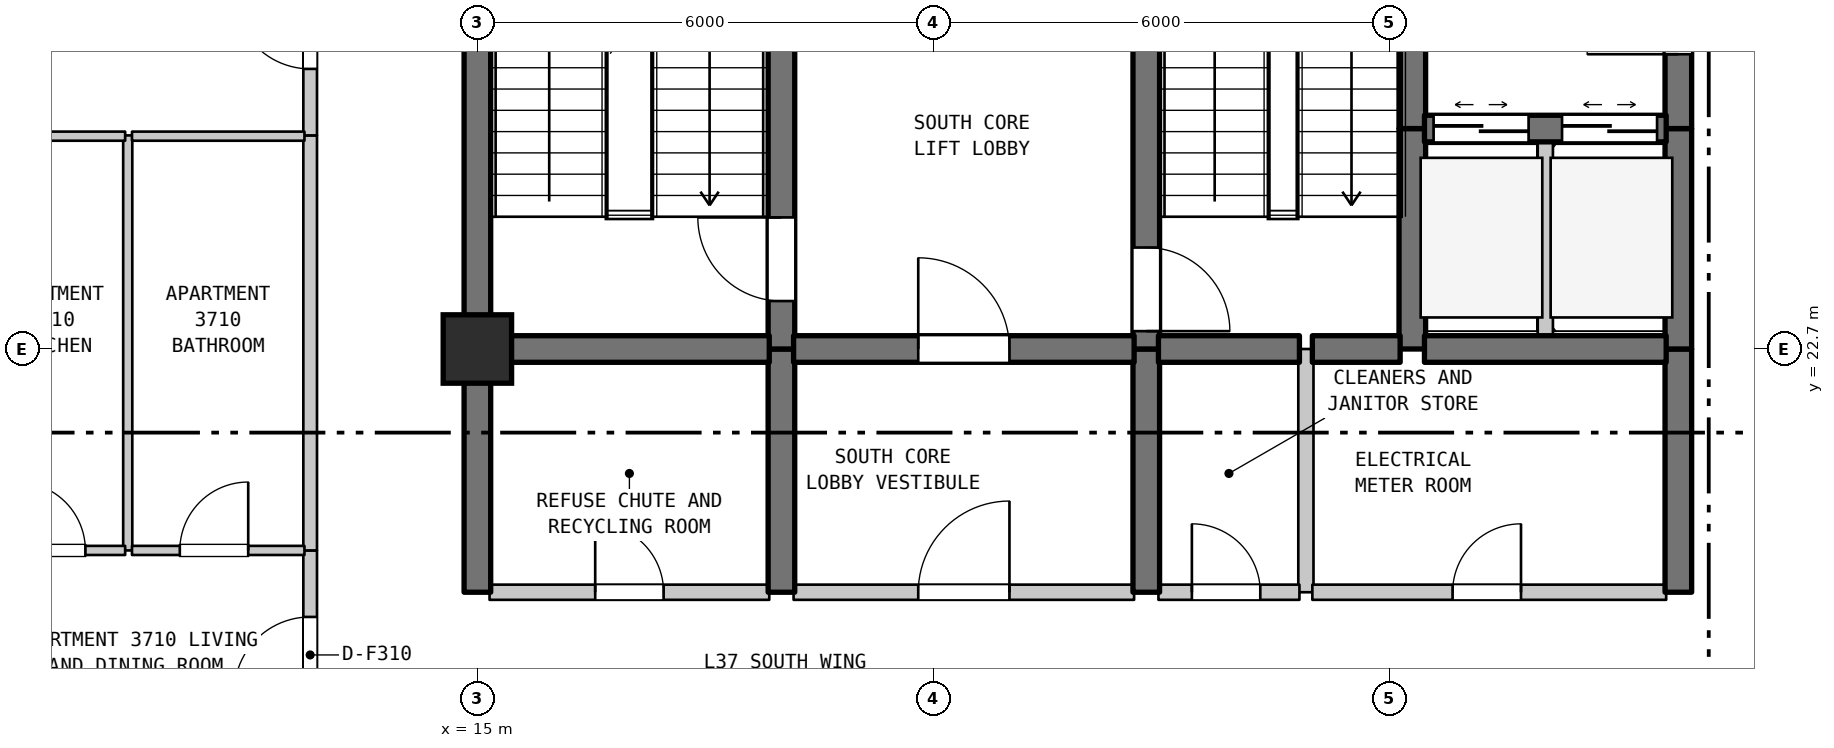
"""IFC4 building model, lengths in metres.
Left out: names, types, materials, properties, quantities, classifications, styles, units other than length and angle.
Written with IfcOpenShell. Run it as: python <this file> out.ifc"""

import sys

from ifc_helpers import new_model, si_unit, direction, frame, frame_2d, origin, origin_2d, place, context, subcontext, project, spatial, rectangle, extrude, element, fill, save


model = new_model("IFC4")
c1 = context("Model", 3, precision=1e-05, world=origin(), true_north=direction((0.0, 1.0)))
c2 = subcontext(c1, "Body", "Model", "MODEL_VIEW")
j1 = project(units=[si_unit("LENGTHUNIT", "METRE"), si_unit("PLANEANGLEUNIT", "RADIAN")], contexts=[c1])
p1 = place(None, origin())
s1 = spatial("IfcSite", under=j1, at=p1, CompositionType="ELEMENT")
p2 = place(p1, origin())
s2 = spatial("IfcBuilding", under=s1, at=p2, CompositionType="ELEMENT")
p3 = place(p2, frame((0.0, 0.0, 152.0)))
s3 = spatial("IfcBuildingStorey", under=s2, at=p3, CompositionType="ELEMENT", Elevation=152.0)
p4 = place(p3, frame((15.0, 22.7, 0.0), z_axis=(0.0, 0.0, 1.0), x_axis=(1.0, 0.0, 0.0)))
e1 = element("IfcColumn", 1, at=p4, inside=s3, PredefinedType="COLUMN", context=c2, shape_type="SweptSolid", body=[
    extrude(rectangle(XDim=0.9, YDim=0.9, at=origin_2d()), origin(), (0.0, 0.0, 1.0), 3.7),
])
p5 = place(p3, frame((10.4, 20.05, 0.0), z_axis=(0.0, 0.0, 1.0), x_axis=(0.0, 1.0, 0.0)))
e2 = element("IfcWall", 2, at=p5, inside=s3, PredefinedType="PARTITIONING", context=c2, shape_type="SweptSolid", body=[
    extrude(rectangle(XDim=5.46, YDim=0.12, at=frame_2d((2.73, 0.0))), origin(), (0.0, 0.0, 1.0), 3.385),
])
p6 = place(p3, frame((12.8, 17.3, 0.0), z_axis=(0.0, 0.0, 1.0), x_axis=(0.0, 1.0, 0.0)))
e3 = element("IfcWall", 3, at=p6, inside=s3, PredefinedType="STANDARD", context=c2, shape_type="SweptSolid", body=[
    extrude(rectangle(XDim=2.75, YDim=0.18, at=frame_2d((1.375, 0.0))), origin(), (0.0, 0.0, 1.0), 3.385),
])
p7 = place(p6, frame((0.875, 0.0, 0.0)))
e4 = element("IfcOpeningElement", 4, at=p7, cuts=e3, PredefinedType="OPENING", context=c2, shape_type="SweptSolid", body=[
    extrude(rectangle(XDim=1.0, YDim=2.15, at=frame_2d((0.5, 1.075))), frame((0.0, 0.1, 0.0), z_axis=(0.0, -1.0, 0.0), x_axis=(1.0, 0.0, 0.0)), (0.0, 0.0, 1.0), 0.2),
])
p8 = place(p3, frame((12.8, 20.05, 0.0), z_axis=(0.0, 0.0, 1.0), x_axis=(0.0, 1.0, 0.0)))
e5 = element("IfcWall", 5, at=p8, inside=s3, PredefinedType="STANDARD", context=c2, shape_type="SweptSolid", body=[
    extrude(rectangle(XDim=5.46, YDim=0.18, at=frame_2d((2.73, 0.0))), origin(), (0.0, 0.0, 1.0), 3.385),
])
p9 = place(p3, frame((12.8, 25.51, 0.0), z_axis=(0.0, 0.0, 1.0), x_axis=(0.0, 1.0, 0.0)))
e6 = element("IfcWall", 6, at=p9, inside=s3, PredefinedType="STANDARD", context=c2, shape_type="SweptSolid", body=[
    extrude(rectangle(XDim=2.75, YDim=0.18, at=frame_2d((1.375, 0.0))), origin(), (0.0, 0.0, 1.0), 3.385),
])
p10 = place(p9, frame((0.875, 0.0, 0.0)))
e7 = element("IfcOpeningElement", 7, at=p10, cuts=e6, PredefinedType="OPENING", context=c2, shape_type="SweptSolid", body=[
    extrude(rectangle(XDim=1.0, YDim=2.15, at=frame_2d((0.5, 1.075))), frame((0.0, 0.1, 0.0), z_axis=(0.0, -1.0, 0.0), x_axis=(1.0, 0.0, 0.0)), (0.0, 0.0, 1.0), 0.2),
])
p11 = place(p3, frame((15.0, 19.5, 0.0), z_axis=(0.0, 0.0, 1.0), x_axis=(0.0, 1.0, 0.0)))
e8 = element("IfcWall", 8, at=p11, inside=s3, PredefinedType="SHEAR", context=c2, shape_type="SweptSolid", body=[
    extrude(rectangle(XDim=3.2, YDim=0.35, at=frame_2d((1.6, 0.0))), origin(), (0.0, 0.0, 1.0), 3.385),
])
p12 = place(p3, frame((15.0, 22.7, 0.0), z_axis=(0.0, 0.0, 1.0), x_axis=(0.0, 1.0, 0.0)))
e9 = element("IfcWall", 9, at=p12, inside=s3, PredefinedType="SHEAR", context=c2, shape_type="SweptSolid", body=[
    extrude(rectangle(XDim=6.8, YDim=0.35, at=frame_2d((3.4, 0.0))), origin(), (0.0, 0.0, 1.0), 3.385),
])
p13 = place(p3, frame((19.0, 19.5, 0.0), z_axis=(0.0, 0.0, 1.0), x_axis=(0.0, 1.0, 0.0)))
e10 = element("IfcWall", 10, at=p13, inside=s3, PredefinedType="SHEAR", context=c2, shape_type="SweptSolid", body=[
    extrude(rectangle(XDim=3.2, YDim=0.35, at=frame_2d((1.6, 0.0))), origin(), (0.0, 0.0, 1.0), 3.385),
])
p14 = place(p3, frame((19.0, 22.7, 0.0), z_axis=(0.0, 0.0, 1.0), x_axis=(0.0, 1.0, 0.0)))
e11 = element("IfcWall", 11, at=p14, inside=s3, PredefinedType="SHEAR", context=c2, shape_type="SweptSolid", body=[
    extrude(rectangle(XDim=5.5, YDim=0.35, at=frame_2d((2.75, 0.0))), origin(), (0.0, 0.0, 1.0), 3.385),
])
p15 = place(p14, frame((0.631, 0.0, 0.0)))
e12 = element("IfcOpeningElement", 12, at=p15, cuts=e11, PredefinedType="OPENING", context=c2, shape_type="SweptSolid", body=[
    extrude(rectangle(XDim=1.1, YDim=2.15, at=frame_2d((0.55, 1.075))), frame((0.0, 0.185, 0.0), z_axis=(0.0, -1.0, 0.0), x_axis=(1.0, 0.0, 0.0)), (0.0, 0.0, 1.0), 0.37),
])
p16 = place(p3, frame((23.8, 19.5, 0.0), z_axis=(0.0, 0.0, 1.0), x_axis=(0.0, 1.0, 0.0)))
e13 = element("IfcWall", 13, at=p16, inside=s3, PredefinedType="SHEAR", context=c2, shape_type="SweptSolid", body=[
    extrude(rectangle(XDim=3.2, YDim=0.35, at=frame_2d((1.6, 0.0))), origin(), (0.0, 0.0, 1.0), 3.385),
])
p17 = place(p3, frame((23.8, 22.7, 0.0), z_axis=(0.0, 0.0, 1.0), x_axis=(0.0, 1.0, 0.0)))
e14 = element("IfcWall", 14, at=p17, inside=s3, PredefinedType="SHEAR", context=c2, shape_type="SweptSolid", body=[
    extrude(rectangle(XDim=5.5, YDim=0.35, at=frame_2d((2.75, 0.0))), origin(), (0.0, 0.0, 1.0), 3.385),
])
p18 = place(p17, frame((0.235, 0.0, 0.0)))
e15 = element("IfcOpeningElement", 15, at=p18, cuts=e14, PredefinedType="OPENING", context=c2, shape_type="SweptSolid", body=[
    extrude(rectangle(XDim=1.1, YDim=2.15, at=frame_2d((0.55, 1.075))), frame((0.0, 0.185, 0.0), z_axis=(0.0, -1.0, 0.0), x_axis=(1.0, 0.0, 0.0)), (0.0, 0.0, 1.0), 0.37),
])
p19 = place(p3, frame((25.9, 19.5, 0.0), z_axis=(0.0, 0.0, 1.0), x_axis=(0.0, 1.0, 0.0)))
e16 = element("IfcWall", 16, at=p19, inside=s3, PredefinedType="STANDARD", context=c2, shape_type="SweptSolid", body=[
    extrude(rectangle(XDim=3.2, YDim=0.2, at=frame_2d((1.6, 0.0))), origin(), (0.0, 0.0, 1.0), 3.385),
])
p20 = place(p3, frame((27.3, 22.7, 0.0), z_axis=(0.0, 0.0, 1.0), x_axis=(0.0, 1.0, 0.0)))
e17 = element("IfcWall", 17, at=p20, inside=s3, PredefinedType="SHEAR", context=c2, shape_type="SweptSolid", body=[
    extrude(rectangle(XDim=2.9, YDim=0.35, at=frame_2d((1.45, 0.0))), origin(), (0.0, 0.0, 1.0), 3.385),
])
p21 = place(p3, frame((27.3, 25.6, 0.0), z_axis=(0.0, 0.0, 1.0), x_axis=(0.0, 1.0, 0.0)))
e18 = element("IfcWall", 18, at=p21, inside=s3, PredefinedType="SHEAR", context=c2, shape_type="SweptSolid", body=[
    extrude(rectangle(XDim=3.3, YDim=0.35, at=frame_2d((1.65, 0.0))), origin(), (0.0, 0.0, 1.0), 3.385),
])
p22 = place(p3, frame((29.05, 22.7, 0.0), z_axis=(0.0, 0.0, 1.0), x_axis=(0.0, 1.0, 0.0)))
e19 = element("IfcWall", 19, at=p22, inside=s3, PredefinedType="STANDARD", context=c2, shape_type="SweptSolid", body=[
    extrude(rectangle(XDim=2.9, YDim=0.2, at=frame_2d((1.45, 0.0))), origin(), (0.0, 0.0, 1.0), 3.385),
])
p23 = place(p3, frame((30.8, 19.5, 0.0), z_axis=(0.0, 0.0, 1.0), x_axis=(0.0, 1.0, 0.0)))
e20 = element("IfcWall", 20, at=p23, inside=s3, PredefinedType="SHEAR", context=c2, shape_type="SweptSolid", body=[
    extrude(rectangle(XDim=3.2, YDim=0.35, at=frame_2d((1.6, 0.0))), origin(), (0.0, 0.0, 1.0), 3.385),
])
p24 = place(p3, frame((30.8, 22.7, 0.0), z_axis=(0.0, 0.0, 1.0), x_axis=(0.0, 1.0, 0.0)))
e21 = element("IfcWall", 21, at=p24, inside=s3, PredefinedType="SHEAR", context=c2, shape_type="SweptSolid", body=[
    extrude(rectangle(XDim=2.9, YDim=0.35, at=frame_2d((1.45, 0.0))), origin(), (0.0, 0.0, 1.0), 3.385),
])
p25 = place(p3, frame((30.8, 25.6, 0.0), z_axis=(0.0, 0.0, 1.0), x_axis=(0.0, 1.0, 0.0)))
e22 = element("IfcWall", 22, at=p25, inside=s3, PredefinedType="SHEAR", context=c2, shape_type="SweptSolid", body=[
    extrude(rectangle(XDim=3.3, YDim=0.35, at=frame_2d((1.65, 0.0))), origin(), (0.0, 0.0, 1.0), 3.385),
])
p26 = place(p25, frame((0.978, 0.0, 0.0)))
e23 = element("IfcOpeningElement", 23, at=p26, cuts=e22, PredefinedType="OPENING", context=c2, shape_type="SweptSolid", body=[
    extrude(rectangle(XDim=1.2, YDim=2.2, at=frame_2d((0.6, 1.1))), frame((0.0, 0.185, 0.0), z_axis=(0.0, -1.0, 0.0), x_axis=(1.0, 0.0, 0.0)), (0.0, 0.0, 1.0), 0.37),
])
p27 = place(p3, frame((15.16, 19.5, 0.0), z_axis=(0.0, 0.0, 1.0), x_axis=(1.0, 0.0, 0.0)))
e24 = element("IfcWall", 24, at=p27, inside=s3, PredefinedType="STANDARD", context=c2, shape_type="SweptSolid", body=[
    extrude(rectangle(XDim=3.68, YDim=0.2, at=frame_2d((1.84, 0.0))), origin(), (0.0, 0.0, 1.0), 3.385),
])
p28 = place(p27, frame((1.39, 0.0, 0.0)))
e25 = element("IfcOpeningElement", 25, at=p28, cuts=e24, PredefinedType="OPENING", context=c2, shape_type="SweptSolid", body=[
    extrude(rectangle(XDim=0.9, YDim=2.15, at=frame_2d((0.45, 1.075))), frame((0.0, 0.11, 0.0), z_axis=(0.0, -1.0, 0.0), x_axis=(1.0, 0.0, 0.0)), (0.0, 0.0, 1.0), 0.22),
])
p29 = place(p3, frame((19.16, 19.5, 0.0), z_axis=(0.0, 0.0, 1.0), x_axis=(1.0, 0.0, 0.0)))
e26 = element("IfcWall", 26, at=p29, inside=s3, PredefinedType="STANDARD", context=c2, shape_type="SweptSolid", body=[
    extrude(rectangle(XDim=4.48, YDim=0.2, at=frame_2d((2.24, 0.0))), origin(), (0.0, 0.0, 1.0), 3.385),
])
p30 = place(p29, frame((1.64, 0.0, 0.0)))
e27 = element("IfcOpeningElement", 27, at=p30, cuts=e26, PredefinedType="OPENING", context=c2, shape_type="SweptSolid", body=[
    extrude(rectangle(XDim=1.2, YDim=2.2, at=frame_2d((0.6, 1.1))), frame((0.0, 0.11, 0.0), z_axis=(0.0, -1.0, 0.0), x_axis=(1.0, 0.0, 0.0)), (0.0, 0.0, 1.0), 0.22),
])
p31 = place(p3, frame((23.96, 19.5, 0.0), z_axis=(0.0, 0.0, 1.0), x_axis=(1.0, 0.0, 0.0)))
e28 = element("IfcWall", 28, at=p31, inside=s3, PredefinedType="STANDARD", context=c2, shape_type="SweptSolid", body=[
    extrude(rectangle(XDim=1.855, YDim=0.2, at=frame_2d((0.927, 0.0))), origin(), (0.0, 0.0, 1.0), 3.385),
])
p32 = place(p31, frame((0.44, 0.0, 0.0)))
e29 = element("IfcOpeningElement", 29, at=p32, cuts=e28, PredefinedType="OPENING", context=c2, shape_type="SweptSolid", body=[
    extrude(rectangle(XDim=0.9, YDim=2.15, at=frame_2d((0.45, 1.075))), frame((0.0, 0.11, 0.0), z_axis=(0.0, -1.0, 0.0), x_axis=(1.0, 0.0, 0.0)), (0.0, 0.0, 1.0), 0.22),
])
p33 = place(p3, frame((25.985, 19.5, 0.0), z_axis=(0.0, 0.0, 1.0), x_axis=(1.0, 0.0, 0.0)))
e30 = element("IfcWall", 30, at=p33, inside=s3, PredefinedType="STANDARD", context=c2, shape_type="SweptSolid", body=[
    extrude(rectangle(XDim=4.655, YDim=0.2, at=frame_2d((2.327, 0.0))), origin(), (0.0, 0.0, 1.0), 3.385),
])
p34 = place(p33, frame((1.845, 0.0, 0.0)))
e31 = element("IfcOpeningElement", 31, at=p34, cuts=e30, PredefinedType="OPENING", context=c2, shape_type="SweptSolid", body=[
    extrude(rectangle(XDim=0.9, YDim=2.15, at=frame_2d((0.45, 1.075))), frame((0.0, 0.11, 0.0), z_axis=(0.0, -1.0, 0.0), x_axis=(1.0, 0.0, 0.0)), (0.0, 0.0, 1.0), 0.22),
])
p35 = place(p3, frame((8.421, 20.05, 0.0), z_axis=(0.0, 0.0, 1.0), x_axis=(1.0, 0.0, 0.0)))
e32 = element("IfcWall", 32, at=p35, inside=s3, PredefinedType="PARTITIONING", context=c2, shape_type="SweptSolid", body=[
    extrude(rectangle(XDim=1.945, YDim=0.12, at=frame_2d((0.973, 0.0))), origin(), (0.0, 0.0, 1.0), 3.385),
])
p36 = place(p35, frame((0.522, 0.0, 0.0)))
e33 = element("IfcOpeningElement", 33, at=p36, cuts=e32, PredefinedType="OPENING", context=c2, shape_type="SweptSolid", body=[
    extrude(rectangle(XDim=0.9, YDim=2.15, at=frame_2d((0.45, 1.075))), frame((0.0, 0.07, 0.0), z_axis=(0.0, -1.0, 0.0), x_axis=(1.0, 0.0, 0.0)), (0.0, 0.0, 1.0), 0.14),
])
p37 = place(p3, frame((10.456, 20.05, 0.0), z_axis=(0.0, 0.0, 1.0), x_axis=(1.0, 0.0, 0.0)))
e34 = element("IfcWall", 34, at=p37, inside=s3, PredefinedType="PARTITIONING", context=c2, shape_type="SweptSolid", body=[
    extrude(rectangle(XDim=2.269, YDim=0.12, at=frame_2d((1.135, 0.0))), origin(), (0.0, 0.0, 1.0), 3.385),
])
p38 = place(p37, frame((0.629, 0.0, 0.0)))
e35 = element("IfcOpeningElement", 35, at=p38, cuts=e34, PredefinedType="OPENING", context=c2, shape_type="SweptSolid", body=[
    extrude(rectangle(XDim=0.9, YDim=2.1, at=frame_2d((0.45, 1.05))), frame((0.0, 0.07, 0.0), z_axis=(0.0, -1.0, 0.0), x_axis=(1.0, 0.0, 0.0)), (0.0, 0.0, 1.0), 0.14),
])
p39 = place(p3, frame((15.16, 22.7, 0.0), z_axis=(0.0, 0.0, 1.0), x_axis=(1.0, 0.0, 0.0)))
e36 = element("IfcWall", 36, at=p39, inside=s3, PredefinedType="SHEAR", context=c2, shape_type="SweptSolid", body=[
    extrude(rectangle(XDim=3.68, YDim=0.35, at=frame_2d((1.84, 0.0))), origin(), (0.0, 0.0, 1.0), 3.385),
])
p40 = place(p3, frame((19.16, 22.7, 0.0), z_axis=(0.0, 0.0, 1.0), x_axis=(1.0, 0.0, 0.0)))
e37 = element("IfcWall", 37, at=p40, inside=s3, PredefinedType="SHEAR", context=c2, shape_type="SweptSolid", body=[
    extrude(rectangle(XDim=4.48, YDim=0.35, at=frame_2d((2.24, 0.0))), origin(), (0.0, 0.0, 1.0), 3.385),
])
p41 = place(p40, frame((1.64, 0.0, 0.0)))
e38 = element("IfcOpeningElement", 38, at=p41, cuts=e37, PredefinedType="OPENING", context=c2, shape_type="SweptSolid", body=[
    extrude(rectangle(XDim=1.2, YDim=2.2, at=frame_2d((0.6, 1.1))), frame((0.0, 0.185, 0.0), z_axis=(0.0, -1.0, 0.0), x_axis=(1.0, 0.0, 0.0)), (0.0, 0.0, 1.0), 0.37),
])
p42 = place(p3, frame((23.96, 22.7, 0.0), z_axis=(0.0, 0.0, 1.0), x_axis=(1.0, 0.0, 0.0)))
e39 = element("IfcWall", 39, at=p42, inside=s3, PredefinedType="SHEAR", context=c2, shape_type="SweptSolid", body=[
    extrude(rectangle(XDim=1.855, YDim=0.35, at=frame_2d((0.927, 0.0))), origin(), (0.0, 0.0, 1.0), 3.385),
])
p43 = place(p3, frame((25.985, 22.7, 0.0), z_axis=(0.0, 0.0, 1.0), x_axis=(1.0, 0.0, 0.0)))
e40 = element("IfcWall", 40, at=p43, inside=s3, PredefinedType="SHEAR", context=c2, shape_type="SweptSolid", body=[
    extrude(rectangle(XDim=1.155, YDim=0.35, at=frame_2d((0.577, 0.0))), origin(), (0.0, 0.0, 1.0), 3.385),
])
p44 = place(p3, frame((27.46, 22.7, 0.0), z_axis=(0.0, 0.0, 1.0), x_axis=(1.0, 0.0, 0.0)))
e41 = element("IfcWall", 41, at=p44, inside=s3, PredefinedType="SHEAR", context=c2, shape_type="SweptSolid", body=[
    extrude(rectangle(XDim=3.18, YDim=0.35, at=frame_2d((1.59, 0.0))), origin(), (0.0, 0.0, 1.0), 3.385),
])
p45 = place(p3, frame((8.421, 25.5, 0.0), z_axis=(0.0, 0.0, 1.0), x_axis=(1.0, 0.0, 0.0)))
e42 = element("IfcWall", 42, at=p45, inside=s3, PredefinedType="PARTITIONING", context=c2, shape_type="SweptSolid", body=[
    extrude(rectangle(XDim=1.945, YDim=0.12, at=frame_2d((0.973, 0.0))), origin(), (0.0, 0.0, 1.0), 3.385),
])
p46 = place(p3, frame((10.456, 25.5, 0.0), z_axis=(0.0, 0.0, 1.0), x_axis=(1.0, 0.0, 0.0)))
e43 = element("IfcWall", 43, at=p46, inside=s3, PredefinedType="PARTITIONING", context=c2, shape_type="SweptSolid", body=[
    extrude(rectangle(XDim=2.269, YDim=0.12, at=frame_2d((1.135, 0.0))), origin(), (0.0, 0.0, 1.0), 3.385),
])
p47 = place(p3, frame((27.46, 25.6, 0.0), z_axis=(0.0, 0.0, 1.0), x_axis=(1.0, 0.0, 0.0)))
e44 = element("IfcWall", 44, at=p47, inside=s3, PredefinedType="SHEAR", context=c2, shape_type="SweptSolid", body=[
    extrude(rectangle(XDim=3.18, YDim=0.35, at=frame_2d((1.59, 0.0))), origin(), (0.0, 0.0, 1.0), 3.385),
])
p48 = place(p47, frame((0.12, 0.0, 0.0)))
e45 = element("IfcOpeningElement", 45, at=p48, cuts=e44, PredefinedType="OPENING", context=c2, shape_type="SweptSolid", body=[
    extrude(rectangle(XDim=1.25, YDim=2.2, at=frame_2d((0.625, 1.1))), frame((0.0, 0.185, 0.0), z_axis=(0.0, -1.0, 0.0), x_axis=(1.0, 0.0, 0.0)), (0.0, 0.0, 1.0), 0.37),
])
p49 = place(p47, frame((1.81, 0.0, 0.0)))
e46 = element("IfcOpeningElement", 46, at=p49, cuts=e44, PredefinedType="OPENING", context=c2, shape_type="SweptSolid", body=[
    extrude(rectangle(XDim=1.25, YDim=2.2, at=frame_2d((0.625, 1.1))), frame((0.0, 0.185, 0.0), z_axis=(0.0, -1.0, 0.0), x_axis=(1.0, 0.0, 0.0)), (0.0, 0.0, 1.0), 0.37),
])
p50 = place(p7, origin())
e47 = element("IfcDoor", 47, at=p50, inside=s3, OperationType="SINGLE_SWING_LEFT", PredefinedType="DOOR", context=c2, shape_type="SweptSolid", body=[
    extrude(rectangle(XDim=1.0, YDim=2.15, at=frame_2d((0.5, 1.075))), frame((0.0, 0.025, 0.0), z_axis=(0.0, -1.0, 0.0), x_axis=(1.0, 0.0, 0.0)), (0.0, 0.0, 1.0), 0.05),
])
fill(e4, e47)
p51 = place(p10, origin())
e48 = element("IfcDoor", 48, at=p51, inside=s3, OperationType="SINGLE_SWING_RIGHT", PredefinedType="DOOR", context=c2, shape_type="SweptSolid", body=[
    extrude(rectangle(XDim=1.0, YDim=2.15, at=frame_2d((0.5, 1.075))), frame((0.0, 0.025, 0.0), z_axis=(0.0, -1.0, 0.0), x_axis=(1.0, 0.0, 0.0)), (0.0, 0.0, 1.0), 0.05),
])
fill(e7, e48)
p52 = place(p15, origin())
e49 = element("IfcDoor", 49, at=p52, inside=s3, OperationType="SINGLE_SWING_RIGHT", PredefinedType="DOOR", context=c2, shape_type="SweptSolid", body=[
    extrude(rectangle(XDim=1.1, YDim=2.15, at=frame_2d((0.55, 1.075))), frame((0.0, 0.025, 0.0), z_axis=(0.0, -1.0, 0.0), x_axis=(1.0, 0.0, 0.0)), (0.0, 0.0, 1.0), 0.05),
])
fill(e12, e49)
p53 = place(p18, frame((1.1, 0.0, 0.0), z_axis=(0.0, 0.0, 1.0), x_axis=(-1.0, 0.0, 0.0)))
e50 = element("IfcDoor", 50, at=p53, inside=s3, OperationType="SINGLE_SWING_LEFT", PredefinedType="DOOR", context=c2, shape_type="SweptSolid", body=[
    extrude(rectangle(XDim=1.1, YDim=2.15, at=frame_2d((0.55, 1.075))), frame((0.0, 0.025, 0.0), z_axis=(0.0, -1.0, 0.0), x_axis=(1.0, 0.0, 0.0)), (0.0, 0.0, 1.0), 0.05),
])
fill(e15, e50)
p54 = place(p26, origin())
e51 = element("IfcDoor", 51, at=p54, inside=s3, OperationType="SINGLE_SWING_LEFT", PredefinedType="DOOR", context=c2, shape_type="SweptSolid", body=[
    extrude(rectangle(XDim=1.2, YDim=2.2, at=frame_2d((0.6, 1.1))), frame((0.0, 0.025, 0.0), z_axis=(0.0, -1.0, 0.0), x_axis=(1.0, 0.0, 0.0)), (0.0, 0.0, 1.0), 0.05),
])
fill(e23, e51)
p55 = place(p28, origin())
e52 = element("IfcDoor", 52, at=p55, inside=s3, OperationType="SINGLE_SWING_LEFT", PredefinedType="DOOR", context=c2, shape_type="SweptSolid", body=[
    extrude(rectangle(XDim=0.9, YDim=2.15, at=frame_2d((0.45, 1.075))), frame((0.0, 0.025, 0.0), z_axis=(0.0, -1.0, 0.0), x_axis=(1.0, 0.0, 0.0)), (0.0, 0.0, 1.0), 0.05),
])
fill(e25, e52)
p56 = place(p30, origin())
e53 = element("IfcDoor", 53, at=p56, inside=s3, OperationType="SINGLE_SWING_RIGHT", PredefinedType="DOOR", context=c2, shape_type="SweptSolid", body=[
    extrude(rectangle(XDim=1.2, YDim=2.2, at=frame_2d((0.6, 1.1))), frame((0.0, 0.025, 0.0), z_axis=(0.0, -1.0, 0.0), x_axis=(1.0, 0.0, 0.0)), (0.0, 0.0, 1.0), 0.05),
])
fill(e27, e53)
p57 = place(p32, origin())
e54 = element("IfcDoor", 54, at=p57, inside=s3, OperationType="SINGLE_SWING_LEFT", PredefinedType="DOOR", context=c2, shape_type="SweptSolid", body=[
    extrude(rectangle(XDim=0.9, YDim=2.15, at=frame_2d((0.45, 1.075))), frame((0.0, 0.025, 0.0), z_axis=(0.0, -1.0, 0.0), x_axis=(1.0, 0.0, 0.0)), (0.0, 0.0, 1.0), 0.05),
])
fill(e29, e54)
p58 = place(p34, origin())
e55 = element("IfcDoor", 55, at=p58, inside=s3, OperationType="SINGLE_SWING_RIGHT", PredefinedType="DOOR", context=c2, shape_type="SweptSolid", body=[
    extrude(rectangle(XDim=0.9, YDim=2.15, at=frame_2d((0.45, 1.075))), frame((0.0, 0.025, 0.0), z_axis=(0.0, -1.0, 0.0), x_axis=(1.0, 0.0, 0.0)), (0.0, 0.0, 1.0), 0.05),
])
fill(e31, e55)
p59 = place(p36, origin())
e56 = element("IfcDoor", 56, at=p59, inside=s3, OperationType="SINGLE_SWING_LEFT", PredefinedType="DOOR", context=c2, shape_type="SweptSolid", body=[
    extrude(rectangle(XDim=0.9, YDim=2.15, at=frame_2d((0.45, 1.075))), frame((0.0, 0.025, 0.0), z_axis=(0.0, -1.0, 0.0), x_axis=(1.0, 0.0, 0.0)), (0.0, 0.0, 1.0), 0.05),
])
fill(e33, e56)
p60 = place(p38, origin())
e57 = element("IfcDoor", 57, at=p60, inside=s3, OperationType="SINGLE_SWING_RIGHT", PredefinedType="DOOR", context=c2, shape_type="SweptSolid", body=[
    extrude(rectangle(XDim=0.9, YDim=2.1, at=frame_2d((0.45, 1.05))), frame((0.0, 0.025, 0.0), z_axis=(0.0, -1.0, 0.0), x_axis=(1.0, 0.0, 0.0)), (0.0, 0.0, 1.0), 0.05),
])
fill(e35, e57)
p61 = place(p41, origin())
e58 = element("IfcDoor", 58, at=p61, inside=s3, OperationType="SINGLE_SWING_LEFT", PredefinedType="DOOR", context=c2, shape_type="SweptSolid", body=[
    extrude(rectangle(XDim=1.2, YDim=2.2, at=frame_2d((0.6, 1.1))), frame((0.0, 0.025, 0.0), z_axis=(0.0, -1.0, 0.0), x_axis=(1.0, 0.0, 0.0)), (0.0, 0.0, 1.0), 0.05),
])
fill(e38, e58)
p62 = place(p48, origin())
e59 = element("IfcDoor", 59, at=p62, inside=s3, OperationType="DOUBLE_DOOR_SLIDING", PredefinedType="DOOR", context=c2, shape_type="SweptSolid", body=[
    extrude(rectangle(XDim=1.25, YDim=2.2, at=frame_2d((0.625, 1.1))), frame((0.0, 0.025, 0.0), z_axis=(0.0, -1.0, 0.0), x_axis=(1.0, 0.0, 0.0)), (0.0, 0.0, 1.0), 0.05),
])
fill(e45, e59)
p63 = place(p49, origin())
e60 = element("IfcDoor", 60, at=p63, inside=s3, OperationType="DOUBLE_DOOR_SLIDING", PredefinedType="DOOR", context=c2, shape_type="SweptSolid", body=[
    extrude(rectangle(XDim=1.25, YDim=2.2, at=frame_2d((0.625, 1.1))), frame((0.0, 0.025, 0.0), z_axis=(0.0, -1.0, 0.0), x_axis=(1.0, 0.0, 0.0)), (0.0, 0.0, 1.0), 0.05),
])
fill(e46, e60)
save(model, sys.argv[1])
